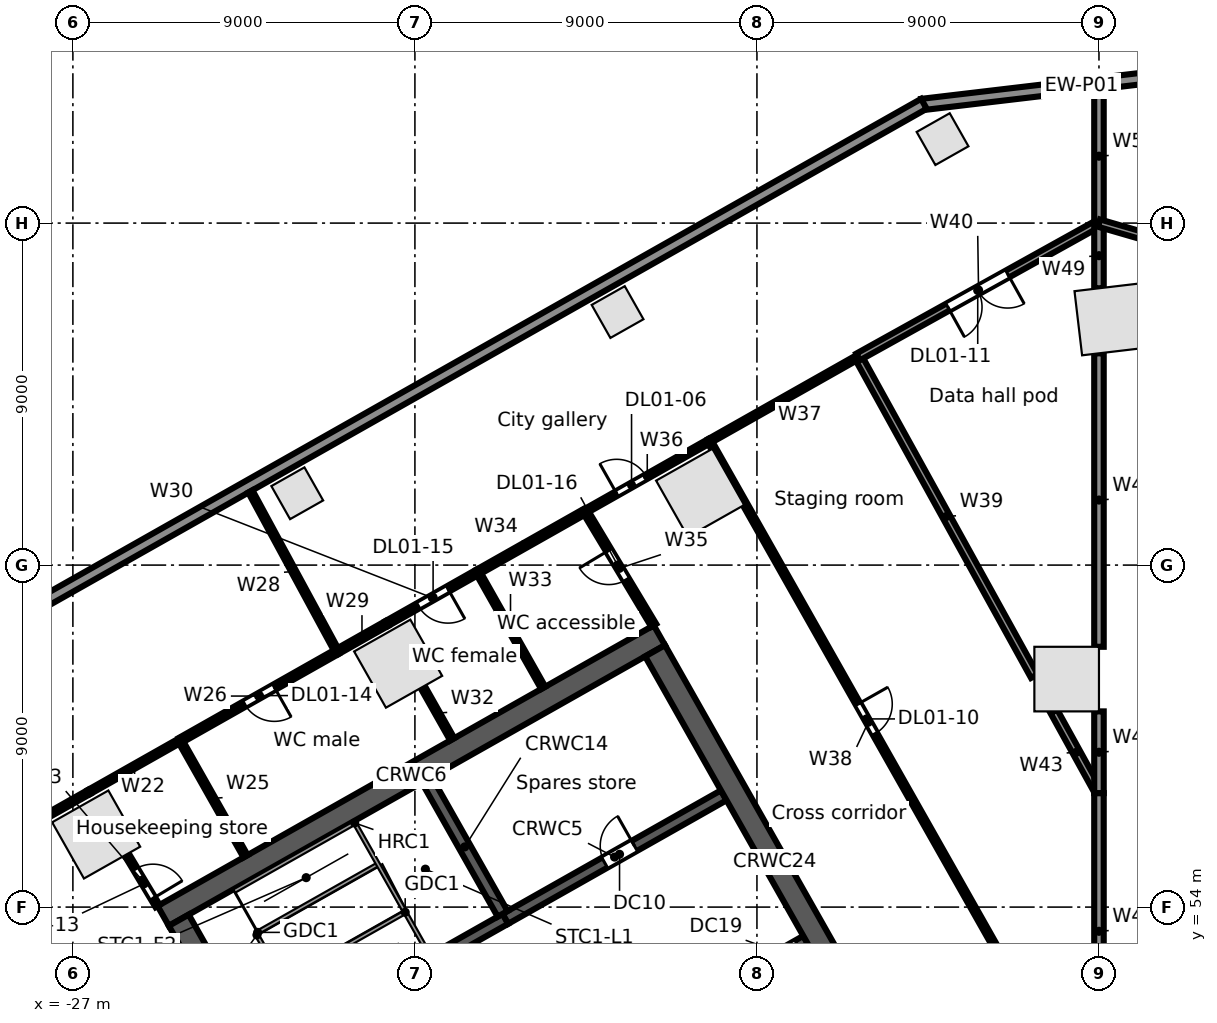
"""IFC4 building model, lengths in metres.
Left out: names, types, materials, properties, quantities, classifications, styles, units other than length and angle.
Written with IfcOpenShell. Run it as: python <this file> out.ifc"""

import sys

from ifc_helpers import new_model, si_unit, direction, frame, frame_2d, origin, origin_2d, place, context, subcontext, project, spatial, rectangle, extrude, element, fill, save


model = new_model("IFC4")
c1 = context("Model", 3, precision=1e-05, world=origin(), true_north=direction((0.0, 1.0)))
c2 = subcontext(c1, "Body", "Model", "MODEL_VIEW")
j1 = project(units=[si_unit("LENGTHUNIT", "METRE"), si_unit("PLANEANGLEUNIT", "RADIAN")], contexts=[c1])
p1 = place(None, origin())
s1 = spatial("IfcSite", under=j1, at=p1, CompositionType="ELEMENT")
p2 = place(p1, origin())
s2 = spatial("IfcBuilding", under=s1, at=p2, CompositionType="ELEMENT")
p3 = place(p2, frame((0.0, 0.0, 11.5)))
s3 = spatial("IfcBuildingStorey", under=s2, at=p3, CompositionType="ELEMENT", Elevation=11.5)
for number, where, z_axis, x_axis in (
    (1, (0.3, 69.464, 0.0), (0.0, 0.0, 1.0), (-0.993, -0.118, 0.0)),
    (2, (-10.495, 64.902, 0.0), (0.0, 0.0, 1.0), (-0.87, -0.492, 0.0)),
    (3, (-18.441, 60.406, 0.0), (0.0, 0.0, 1.0), (-0.87, -0.492, 0.0)),
    (4, (-26.388, 55.91, 0.0), (0.0, 0.0, 1.0), (-0.87, -0.492, 0.0)),
    (5, (-0.85, 60.0, 0.0), (0.0, 0.0, 1.0), (0.0, 1.0, 0.0)),
):
    element("IfcColumn", number, at=place(p3, frame(where, z_axis=z_axis, x_axis=x_axis)), inside=s3, PredefinedType="COLUMN", context=c2, shape_type="SweptSolid", body=[
        extrude(rectangle(XDim=1.7, YDim=1.7, at=origin_2d()), origin(), (0.0, 0.0, 1.0), 5.0),
    ])
for number, where, z_axis, x_axis in (
    (6, (-4.116, 74.21, 0.0), (0.0, 0.0, 1.0), (-0.87, -0.492, 0.0)),
    (7, (-12.667, 69.659, 0.0), (0.0, 0.0, 1.0), (-0.87, -0.492, 0.0)),
    (8, (-21.096, 64.89, 0.0), (0.0, 0.0, 1.0), (-0.87, -0.492, 0.0)),
):
    element("IfcColumn", number, at=place(p3, frame(where, z_axis=z_axis, x_axis=x_axis)), inside=s3, PredefinedType="COLUMN", context=c2, shape_type="SweptSolid", body=[
        extrude(rectangle(XDim=1.0, YDim=1.0, at=origin_2d()), origin(), (0.0, 0.0, 1.0), 5.0),
    ])
p4 = place(p3, frame((-4.663, 75.12, 0.0), z_axis=(0.0, 0.0, 1.0), x_axis=(0.993069631717, 0.11752747152, 0.0)))
e9 = element("IfcWall", 9, at=p4, inside=s3, PredefinedType="STANDARD", context=c2, shape_type="SweptSolid", body=[
    extrude(rectangle(XDim=8.463, YDim=0.3, at=frame_2d((4.231, 0.0))), origin(), (0.0, 0.0, 1.0), 4.65),
])
p5 = place(p3, frame((-63.707, 41.701, 0.0), z_axis=(0.0, 0.0, 1.0), x_axis=(0.870355510268, 0.492423888277, 0.0)))
e10 = element("IfcWall", 10, at=p5, inside=s3, PredefinedType="STANDARD", context=c2, shape_type="SweptSolid", body=[
    extrude(rectangle(XDim=67.903, YDim=0.3, at=frame_2d((33.952, 0.0))), origin(), (0.0, 0.0, 1.0), 4.65),
])
p6 = place(p3, frame((-13.365, 49.911, 0.0), z_axis=(0.0, 0.0, 1.0), x_axis=(0.870340995471, 0.49244954219, 0.0)))
e11 = element("IfcWall", 11, at=p6, inside=s3, PredefinedType="SOLIDWALL", context=c2, shape_type="SweptSolid", body=[
    extrude(rectangle(XDim=6.5, YDim=0.3, at=frame_2d((3.25, 0.0))), origin(), (0.0, 0.0, 1.0), 4.65),
])
p7 = place(p6, frame((1.95, 0.0, 0.0)))
e12 = element("IfcOpeningElement", 12, at=p7, cuts=e11, PredefinedType="OPENING", context=c2, shape_type="SweptSolid", body=[
    extrude(rectangle(XDim=0.9, YDim=2.1, at=frame_2d((0.45, 1.05))), frame((0.0, 0.16, 0.0), z_axis=(0.0, -1.0, 0.0), x_axis=(1.0, 0.0, 0.0)), (0.0, 0.0, 1.0), 0.32),
])
p8 = place(p6, frame((5.35, 0.0, 0.0)))
e13 = element("IfcOpeningElement", 13, at=p8, cuts=e11, PredefinedType="OPENING", context=c2, shape_type="SweptSolid", body=[
    extrude(rectangle(XDim=0.9, YDim=2.1, at=frame_2d((0.45, 1.05))), frame((0.0, 0.16, 0.0), z_axis=(0.0, -1.0, 0.0), x_axis=(1.0, 0.0, 0.0)), (0.0, 0.0, 1.0), 0.32),
])
p9 = place(p3, frame((-21.885, 50.146, 0.0), z_axis=(0.0, 0.0, 1.0), x_axis=(0.870359411463, 0.492416992881, 0.0)))
e14 = element("IfcWall", 14, at=p9, inside=s3, PredefinedType="SOLIDWALL", context=c2, shape_type="SweptSolid", body=[
    extrude(rectangle(XDim=7.2, YDim=0.3, at=frame_2d((3.6, 0.0))), origin(), (0.0, 0.0, 1.0), 4.65),
])
p10 = place(p9, frame((0.2, 0.0, 0.0)))
e15 = element("IfcOpeningElement", 15, at=p10, cuts=e14, PredefinedType="OPENING", context=c2, shape_type="SweptSolid", body=[
    extrude(rectangle(XDim=1.0, YDim=2.1, at=frame_2d((0.5, 1.05))), frame((0.0, 0.16, 0.0), z_axis=(0.0, -1.0, 0.0), x_axis=(1.0, 0.0, 0.0)), (0.0, 0.0, 1.0), 0.32),
])
p11 = place(p3, frame((-15.618, 53.691, 0.0), z_axis=(0.0, 0.0, 1.0), x_axis=(0.870356769198, 0.492421663121, 0.0)))
e16 = element("IfcWall", 16, at=p11, inside=s3, PredefinedType="SOLIDWALL", context=c2, shape_type="SweptSolid", body=[
    extrude(rectangle(XDim=6.6, YDim=0.3, at=frame_2d((3.3, 0.0))), origin(), (0.0, 0.0, 1.0), 4.65),
])
p12 = place(p11, frame((3.0, 0.0, 0.0)))
e17 = element("IfcOpeningElement", 17, at=p12, cuts=e16, PredefinedType="OPENING", context=c2, shape_type="SweptSolid", body=[
    extrude(rectangle(XDim=0.9, YDim=2.1, at=frame_2d((0.45, 1.05))), frame((0.0, 0.16, 0.0), z_axis=(0.0, -1.0, 0.0), x_axis=(1.0, 0.0, 0.0)), (0.0, 0.0, 1.0), 0.32),
])
p13 = place(p3, frame((-24.623, 53.767, 0.0), z_axis=(0.0, 0.0, 1.0), x_axis=(0.870356627484, 0.492421913601, 0.0)))
e18 = element("IfcWall", 18, at=p13, inside=s3, PredefinedType="SOLIDWALL", context=c2, shape_type="SweptSolid", body=[
    extrude(rectangle(XDim=15.0, YDim=0.6, at=frame_2d((7.5, 0.0))), origin(), (0.0, 0.0, 1.0), 4.65),
])
p14 = place(p3, frame((-24.214, 53.654, 0.0), z_axis=(0.0, 0.0, 1.0), x_axis=(0.492441221355, -0.870345703448, 0.0)))
e19 = element("IfcWall", 19, at=p14, inside=s3, PredefinedType="SOLIDWALL", context=c2, shape_type="SweptSolid", body=[
    extrude(rectangle(XDim=12.8, YDim=0.6, at=frame_2d((6.4, 0.0))), origin(), (0.0, 0.0, 1.0), 4.65),
])
p15 = place(p3, frame((-17.686, 57.347, 0.0), z_axis=(0.0, 0.0, 1.0), x_axis=(0.492420746998, -0.870357287513, 0.0)))
e20 = element("IfcWall", 20, at=p15, inside=s3, PredefinedType="SOLIDWALL", context=c2, shape_type="SweptSolid", body=[
    extrude(rectangle(XDim=4.05, YDim=0.3, at=frame_2d((2.025, 0.0))), origin(), (0.0, 0.0, 1.0), 4.65),
])
p16 = place(p3, frame((-11.681, 60.744, 0.0), z_axis=(0.0, 0.0, 1.0), x_axis=(0.492426772896, -0.870353878221, 0.0)))
e21 = element("IfcWall", 21, at=p16, inside=s3, PredefinedType="SOLIDWALL", context=c2, shape_type="SweptSolid", body=[
    extrude(rectangle(XDim=12.8, YDim=0.6, at=frame_2d((6.4, 0.0))), origin(), (0.0, 0.0, 1.0), 4.65),
])
p17 = place(p3, frame((-33.536, 53.09, 0.0), z_axis=(0.0, 0.0, 1.0), x_axis=(0.870327439455, 0.492473499928, 0.0)))
e22 = element("IfcWall", 22, at=p17, inside=s3, PredefinedType="PARTITIONING", context=c2, shape_type="SweptSolid", body=[
    extrude(rectangle(XDim=8.0, YDim=0.125, at=frame_2d((4.0, 0.0))), origin(), (0.0, 0.0, 1.0), 3.712),
])
p18 = place(p17, frame((3.45, 0.0, 0.0)))
e23 = element("IfcOpeningElement", 23, at=p18, cuts=e22, PredefinedType="OPENING", context=c2, shape_type="SweptSolid", body=[
    extrude(rectangle(XDim=0.9, YDim=2.1, at=frame_2d((0.45, 1.05))), frame((0.0, 0.073, 0.0), z_axis=(0.0, -1.0, 0.0), x_axis=(1.0, 0.0, 0.0)), (0.0, 0.0, 1.0), 0.145),
])
p19 = place(p3, frame((-26.573, 57.03, 0.0), z_axis=(0.0, 0.0, 1.0), x_axis=(0.870344460795, 0.492443417626, 0.0)))
e24 = element("IfcWall", 24, at=p19, inside=s3, PredefinedType="PARTITIONING", context=c2, shape_type="SweptSolid", body=[
    extrude(rectangle(XDim=2.75, YDim=0.125, at=frame_2d((1.375, 0.0))), origin(), (0.0, 0.0, 1.0), 4.65),
])
p20 = place(p3, frame((-25.587, 55.387, 0.0), z_axis=(0.0, 0.0, 1.0), x_axis=(0.514767546849, -0.857329792268, 0.0)))
e25 = element("IfcWall", 25, at=p20, inside=s3, PredefinedType="PARTITIONING", context=c2, shape_type="SweptSolid", body=[
    extrude(rectangle(XDim=1.585, YDim=0.125, at=frame_2d((0.792, 0.0))), origin(), (0.0, 0.0, 1.0), 4.65),
])
p21 = place(p20, frame((0.45, 0.0, 0.0)))
e26 = element("IfcOpeningElement", 26, at=p21, cuts=e25, PredefinedType="OPENING", context=c2, shape_type="SweptSolid", body=[
    extrude(rectangle(XDim=0.9, YDim=2.1, at=frame_2d((0.45, 1.05))), frame((0.0, 0.073, 0.0), z_axis=(0.0, -1.0, 0.0), x_axis=(1.0, 0.0, 0.0)), (0.0, 0.0, 1.0), 0.145),
])
p22 = place(p3, frame((-24.18, 58.384, 0.0), z_axis=(0.0, 0.0, 1.0), x_axis=(0.492521469645, -0.870300294116, 0.0)))
e27 = element("IfcWall", 27, at=p22, inside=s3, PredefinedType="PARTITIONING", context=c2, shape_type="SweptSolid", body=[
    extrude(rectangle(XDim=3.5, YDim=0.125, at=frame_2d((1.75, 0.0))), origin(), (0.0, 0.0, 1.0), 3.93),
])
p23 = place(p3, frame((-24.18, 58.384, 0.0), z_axis=(0.0, 0.0, 1.0), x_axis=(0.870360772617, 0.492414587, 0.0)))
e28 = element("IfcWall", 28, at=p23, inside=s3, PredefinedType="PARTITIONING", context=c2, shape_type="SweptSolid", body=[
    extrude(rectangle(XDim=4.75, YDim=0.15, at=frame_2d((2.375, 0.0))), origin(), (0.0, 0.0, 1.0), 4.65),
])
p24 = place(p23, frame((1.95, 0.0, 0.0)))
e29 = element("IfcOpeningElement", 29, at=p24, cuts=e28, PredefinedType="OPENING", context=c2, shape_type="SweptSolid", body=[
    extrude(rectangle(XDim=0.9, YDim=2.1, at=frame_2d((0.45, 1.05))), frame((0.0, 0.085, 0.0), z_axis=(0.0, -1.0, 0.0), x_axis=(1.0, 0.0, 0.0)), (0.0, 0.0, 1.0), 0.17),
])
p25 = place(p3, frame((-22.33, 64.939, 0.0), z_axis=(0.0, 0.0, 1.0), x_axis=(0.476360236723, -0.879250206067, 0.0)))
e30 = element("IfcWall", 30, at=p25, inside=s3, PredefinedType="PARTITIONING", context=c2, shape_type="SweptSolid", body=[
    extrude(rectangle(XDim=4.795, YDim=0.125, at=frame_2d((2.397, 0.0))), origin(), (0.0, 0.0, 1.0), 3.93),
])
p26 = place(p3, frame((-20.046, 60.723, 0.0), z_axis=(0.0, 0.0, 1.0), x_axis=(0.870308175411, 0.492507542899, 0.0)))
e31 = element("IfcWall", 31, at=p26, inside=s3, PredefinedType="PARTITIONING", context=c2, shape_type="SweptSolid", body=[
    extrude(rectangle(XDim=1.5, YDim=0.15, at=frame_2d((0.75, 0.0))), origin(), (0.0, 0.0, 1.0), 3.93),
])
p27 = place(p3, frame((-18.74, 61.462, 0.0), z_axis=(0.0, 0.0, 1.0), x_axis=(0.870430549821, 0.492291232848, 0.0)))
e32 = element("IfcWall", 32, at=p27, inside=s3, PredefinedType="PARTITIONING", context=c2, shape_type="SweptSolid", body=[
    extrude(rectangle(XDim=2.75, YDim=0.15, at=frame_2d((1.375, 0.0))), origin(), (0.0, 0.0, 1.0), 4.65),
])
p28 = place(p27, frame((0.95, 0.0, 0.0)))
e33 = element("IfcOpeningElement", 33, at=p28, cuts=e32, PredefinedType="OPENING", context=c2, shape_type="SweptSolid", body=[
    extrude(rectangle(XDim=0.9, YDim=2.1, at=frame_2d((0.45, 1.05))), frame((0.0, 0.085, 0.0), z_axis=(0.0, -1.0, 0.0), x_axis=(1.0, 0.0, 0.0)), (0.0, 0.0, 1.0), 0.17),
])
p29 = place(p3, frame((-17.797, 59.794, 0.0), z_axis=(0.0, 0.0, 1.0), x_axis=(0.492366981934, -0.870387703901, 0.0)))
e34 = element("IfcWall", 34, at=p29, inside=s3, PredefinedType="PARTITIONING", context=c2, shape_type="SweptSolid", body=[
    extrude(rectangle(XDim=1.584, YDim=0.125, at=frame_2d((0.792, 0.0))), origin(), (0.0, 0.0, 1.0), 4.65),
])
p30 = place(p3, frame((-16.346, 62.816, 0.0), z_axis=(0.0, 0.0, 1.0), x_axis=(0.492220429283, -0.870470590541, 0.0)))
e35 = element("IfcWall", 35, at=p30, inside=s3, PredefinedType="PARTITIONING", context=c2, shape_type="SweptSolid", body=[
    extrude(rectangle(XDim=3.5, YDim=0.125, at=frame_2d((1.75, 0.0))), origin(), (0.0, 0.0, 1.0), 3.93),
])
p31 = place(p3, frame((-16.346, 62.816, 0.0), z_axis=(0.0, 0.0, 1.0), x_axis=(0.870334637055, 0.492460779699, 0.0)))
e36 = element("IfcWall", 36, at=p31, inside=s3, PredefinedType="PARTITIONING", context=c2, shape_type="SweptSolid", body=[
    extrude(rectangle(XDim=3.249, YDim=0.15, at=frame_2d((1.625, 0.0))), origin(), (0.0, 0.0, 1.0), 4.65),
])
p32 = place(p3, frame((-13.518, 64.416, 0.0), z_axis=(0.0, 0.0, 1.0), x_axis=(0.514875058642, -0.857265229663, 0.0)))
e37 = element("IfcWall", 37, at=p32, inside=s3, PredefinedType="PARTITIONING", context=c2, shape_type="SweptSolid", body=[
    extrude(rectangle(XDim=3.502, YDim=0.15, at=frame_2d((1.751, 0.0))), origin(), (0.0, 0.0, 1.0), 3.93),
])
p33 = place(p32, frame((1.2, 0.0, 0.0)))
e38 = element("IfcOpeningElement", 38, at=p33, cuts=e37, PredefinedType="OPENING", context=c2, shape_type="SweptSolid", body=[
    extrude(rectangle(XDim=0.9, YDim=2.1, at=frame_2d((0.45, 1.05))), frame((0.0, 0.085, 0.0), z_axis=(0.0, -1.0, 0.0), x_axis=(1.0, 0.0, 0.0)), (0.0, 0.0, 1.0), 0.17),
])
p34 = place(p3, frame((-13.518, 64.416, 0.0), z_axis=(0.0, 0.0, 1.0), x_axis=(0.870338454914, 0.492454032268, 0.0)))
e39 = element("IfcWall", 39, at=p34, inside=s3, PredefinedType="PARTITIONING", context=c2, shape_type="SweptSolid", body=[
    extrude(rectangle(XDim=3.75, YDim=0.125, at=frame_2d((1.875, 0.0))), origin(), (0.0, 0.0, 1.0), 3.712),
])
p35 = place(p34, frame((0.95, 0.0, 0.0)))
e40 = element("IfcOpeningElement", 40, at=p35, cuts=e39, PredefinedType="OPENING", context=c2, shape_type="SweptSolid", body=[
    extrude(rectangle(XDim=0.9, YDim=2.1, at=frame_2d((0.45, 1.05))), frame((0.0, 0.073, 0.0), z_axis=(0.0, -1.0, 0.0), x_axis=(1.0, 0.0, 0.0)), (0.0, 0.0, 1.0), 0.145),
])
p36 = place(p3, frame((-10.254, 66.263, 0.0), z_axis=(0.0, 0.0, 1.0), x_axis=(0.870454697906, 0.492248533664, 0.0)))
e41 = element("IfcWall", 41, at=p36, inside=s3, PredefinedType="PARTITIONING", context=c2, shape_type="SweptSolid", body=[
    extrude(rectangle(XDim=4.5, YDim=0.125, at=frame_2d((2.25, 0.0))), origin(), (0.0, 0.0, 1.0), 4.65),
])
p37 = place(p3, frame((-10.254, 66.263, 0.0), z_axis=(0.0, 0.0, 1.0), x_axis=(0.492411664329, -0.870362426138, 0.0)))
e42 = element("IfcWall", 42, at=p37, inside=s3, PredefinedType="PARTITIONING", context=c2, shape_type="SweptSolid", body=[
    extrude(rectangle(XDim=17.0, YDim=0.125, at=frame_2d((8.5, 0.0))), origin(), (0.0, 0.0, 1.0), 3.712),
])
p38 = place(p37, frame((7.95, 0.0, 0.0)))
e43 = element("IfcOpeningElement", 43, at=p38, cuts=e42, PredefinedType="OPENING", context=c2, shape_type="SweptSolid", body=[
    extrude(rectangle(XDim=0.9, YDim=2.1, at=frame_2d((0.45, 1.05))), frame((0.0, 0.073, 0.0), z_axis=(0.0, -1.0, 0.0), x_axis=(1.0, 0.0, 0.0)), (0.0, 0.0, 1.0), 0.145),
])
p39 = place(p3, frame((-6.337, 68.478, 0.0), z_axis=(0.0, 0.0, 1.0), x_axis=(0.483322867171, -0.875442177456, 0.0)))
e44 = element("IfcWall", 44, at=p39, inside=s3, PredefinedType="PARTITIONING", context=c2, shape_type="SweptSolid", body=[
    extrude(rectangle(XDim=9.594, YDim=0.2, at=frame_2d((4.797, 0.0))), origin(), (0.0, 0.0, 1.0), 3.712),
])
p40 = place(p3, frame((-6.337, 68.478, 0.0), z_axis=(0.0, 0.0, 1.0), x_axis=(0.87407148623, 0.485797320864, 0.0)))
e45 = element("IfcWall", 45, at=p40, inside=s3, PredefinedType="PARTITIONING", context=c2, shape_type="SweptSolid", body=[
    extrude(rectangle(XDim=7.25, YDim=0.2, at=frame_2d((3.625, 0.0))), origin(), (0.0, 0.0, 1.0), 3.93),
])
p41 = place(p40, frame((2.7, 0.0, 0.0)))
e46 = element("IfcOpeningElement", 46, at=p41, cuts=e45, PredefinedType="OPENING", context=c2, shape_type="SweptSolid", body=[
    extrude(rectangle(XDim=1.8, YDim=2.1, at=frame_2d((0.9, 1.05))), frame((0.0, 0.11, 0.0), z_axis=(0.0, -1.0, 0.0), x_axis=(1.0, 0.0, 0.0)), (0.0, 0.0, 1.0), 0.22),
])
p42 = place(p3, frame((-1.187, 59.15, 0.0), z_axis=(0.0, 0.0, 1.0), x_axis=(0.483345381597, -0.875429747089, 0.0)))
e47 = element("IfcWall", 47, at=p42, inside=s3, PredefinedType="PARTITIONING", context=c2, shape_type="SweptSolid", body=[
    extrude(rectangle(XDim=2.456, YDim=0.2, at=frame_2d((1.228, 0.0))), origin(), (0.0, 0.0, 1.0), 4.65),
])
p43 = place(p3, frame((0.0, 49.726, 0.0), z_axis=(0.0, 0.0, 1.0), x_axis=(0.0, 1.0, 0.0)))
e48 = element("IfcWall", 48, at=p43, inside=s3, PredefinedType="PARTITIONING", context=c2, shape_type="SweptSolid", body=[
    extrude(rectangle(XDim=7.274, YDim=0.25, at=frame_2d((3.637, 0.0))), origin(), (0.0, 0.0, 1.0), 4.65),
])
p44 = place(p3, frame((0.0, 57.0, 0.0), z_axis=(0.0, 0.0, 1.0), x_axis=(0.0, 1.0, 0.0)))
e49 = element("IfcWall", 49, at=p44, inside=s3, PredefinedType="PARTITIONING", context=c2, shape_type="SweptSolid", body=[
    extrude(rectangle(XDim=2.15, YDim=0.25, at=frame_2d((1.075, 0.0))), origin(), (0.0, 0.0, 1.0), 4.65),
])
p45 = place(p3, frame((0.0, 60.85, 0.0), z_axis=(0.0, 0.0, 1.0), x_axis=(0.0, 1.0, 0.0)))
e50 = element("IfcWall", 50, at=p45, inside=s3, PredefinedType="PARTITIONING", context=c2, shape_type="SweptSolid", body=[
    extrude(rectangle(XDim=7.723, YDim=0.25, at=frame_2d((3.861, 0.0))), origin(), (0.0, 0.0, 1.0), 3.93),
])
p46 = place(p3, frame((0.0, 70.285, 0.0), z_axis=(0.0, 0.0, 1.0), x_axis=(0.0, 1.0, 0.0)))
e51 = element("IfcWall", 51, at=p46, inside=s3, PredefinedType="PARTITIONING", context=c2, shape_type="SweptSolid", body=[
    extrude(rectangle(XDim=1.715, YDim=0.25, at=frame_2d((0.857, 0.0))), origin(), (0.0, 0.0, 1.0), 4.65),
])
p47 = place(p3, frame((0.0, 72.0, 0.0), z_axis=(0.0, 0.0, 1.0), x_axis=(0.0, 1.0, 0.0)))
e52 = element("IfcWall", 52, at=p47, inside=s3, PredefinedType="PARTITIONING", context=c2, shape_type="SweptSolid", body=[
    extrude(rectangle(XDim=3.521, YDim=0.25, at=frame_2d((1.76, 0.0))), origin(), (0.0, 0.0, 1.0), 4.024),
])
p48 = place(p3, frame((0.0, 72.0, 0.0), z_axis=(0.0, 0.0, 1.0), x_axis=(0.960375968852, -0.278707729443, 0.0)))
e53 = element("IfcWall", 53, at=p48, inside=s3, PredefinedType="PARTITIONING", context=c2, shape_type="SweptSolid", body=[
    extrude(rectangle(XDim=11.058, YDim=0.2, at=frame_2d((5.529, 0.0))), origin(), (0.0, 0.0, 1.0), 3.712),
])
p49 = place(p12, origin())
e54 = element("IfcDoor", 54, at=p49, inside=s3, OperationType="SINGLE_SWING_RIGHT", PredefinedType="DOOR", context=c2, shape_type="SweptSolid", body=[
    extrude(rectangle(XDim=0.9, YDim=2.1, at=frame_2d((0.45, 1.05))), frame((0.0, 0.025, 0.0), z_axis=(0.0, -1.0, 0.0), x_axis=(1.0, 0.0, 0.0)), (0.0, 0.0, 1.0), 0.05),
])
fill(e17, e54)
p50 = place(p35, origin())
e55 = element("IfcDoor", 55, at=p50, inside=s3, OperationType="SINGLE_SWING_LEFT", PredefinedType="DOOR", context=c2, shape_type="SweptSolid", body=[
    extrude(rectangle(XDim=0.9, YDim=2.1, at=frame_2d((0.45, 1.05))), frame((0.0, 0.025, 0.0), z_axis=(0.0, -1.0, 0.0), x_axis=(1.0, 0.0, 0.0)), (0.0, 0.0, 1.0), 0.05),
])
fill(e40, e55)
p51 = place(p38, origin())
e56 = element("IfcDoor", 56, at=p51, inside=s3, OperationType="SINGLE_SWING_LEFT", PredefinedType="DOOR", context=c2, shape_type="SweptSolid", body=[
    extrude(rectangle(XDim=0.9, YDim=2.1, at=frame_2d((0.45, 1.05))), frame((0.0, 0.025, 0.0), z_axis=(0.0, -1.0, 0.0), x_axis=(1.0, 0.0, 0.0)), (0.0, 0.0, 1.0), 0.05),
])
fill(e43, e56)
p52 = place(p41, frame((1.8, 0.0, 0.0), z_axis=(0.0, 0.0, 1.0), x_axis=(-1.0, 0.0, 0.0)))
e57 = element("IfcDoor", 57, at=p52, inside=s3, OperationType="DOUBLE_DOOR_SINGLE_SWING", PredefinedType="DOOR", context=c2, shape_type="SweptSolid", body=[
    extrude(rectangle(XDim=1.8, YDim=2.1, at=frame_2d((0.9, 1.05))), frame((0.0, 0.025, 0.0), z_axis=(0.0, -1.0, 0.0), x_axis=(1.0, 0.0, 0.0)), (0.0, 0.0, 1.0), 0.05),
])
fill(e46, e57)
p53 = place(p21, origin())
e58 = element("IfcDoor", 58, at=p53, inside=s3, OperationType="SINGLE_SWING_RIGHT", PredefinedType="DOOR", context=c2, shape_type="SweptSolid", body=[
    extrude(rectangle(XDim=0.9, YDim=2.1, at=frame_2d((0.45, 1.05))), frame((0.0, 0.025, 0.0), z_axis=(0.0, -1.0, 0.0), x_axis=(1.0, 0.0, 0.0)), (0.0, 0.0, 1.0), 0.05),
])
fill(e26, e58)
p54 = place(p24, frame((0.9, 0.0, 0.0), z_axis=(0.0, 0.0, 1.0), x_axis=(-1.0, 0.0, 0.0)))
e59 = element("IfcDoor", 59, at=p54, inside=s3, OperationType="SINGLE_SWING_LEFT", PredefinedType="DOOR", context=c2, shape_type="SweptSolid", body=[
    extrude(rectangle(XDim=0.9, YDim=2.1, at=frame_2d((0.45, 1.05))), frame((0.0, 0.025, 0.0), z_axis=(0.0, -1.0, 0.0), x_axis=(1.0, 0.0, 0.0)), (0.0, 0.0, 1.0), 0.05),
])
fill(e29, e59)
p55 = place(p28, frame((0.9, 0.0, 0.0), z_axis=(0.0, 0.0, 1.0), x_axis=(-1.0, 0.0, 0.0)))
e60 = element("IfcDoor", 60, at=p55, inside=s3, OperationType="SINGLE_SWING_LEFT", PredefinedType="DOOR", context=c2, shape_type="SweptSolid", body=[
    extrude(rectangle(XDim=0.9, YDim=2.1, at=frame_2d((0.45, 1.05))), frame((0.0, 0.025, 0.0), z_axis=(0.0, -1.0, 0.0), x_axis=(1.0, 0.0, 0.0)), (0.0, 0.0, 1.0), 0.05),
])
fill(e33, e60)
p56 = place(p33, frame((0.9, 0.0, 0.0), z_axis=(0.0, 0.0, 1.0), x_axis=(-1.0, 0.0, 0.0)))
e61 = element("IfcDoor", 61, at=p56, inside=s3, OperationType="SINGLE_SWING_RIGHT", PredefinedType="DOOR", context=c2, shape_type="SweptSolid", body=[
    extrude(rectangle(XDim=0.9, YDim=2.1, at=frame_2d((0.45, 1.05))), frame((0.0, 0.025, 0.0), z_axis=(0.0, -1.0, 0.0), x_axis=(1.0, 0.0, 0.0)), (0.0, 0.0, 1.0), 0.05),
])
fill(e38, e61)
save(model, sys.argv[1])
